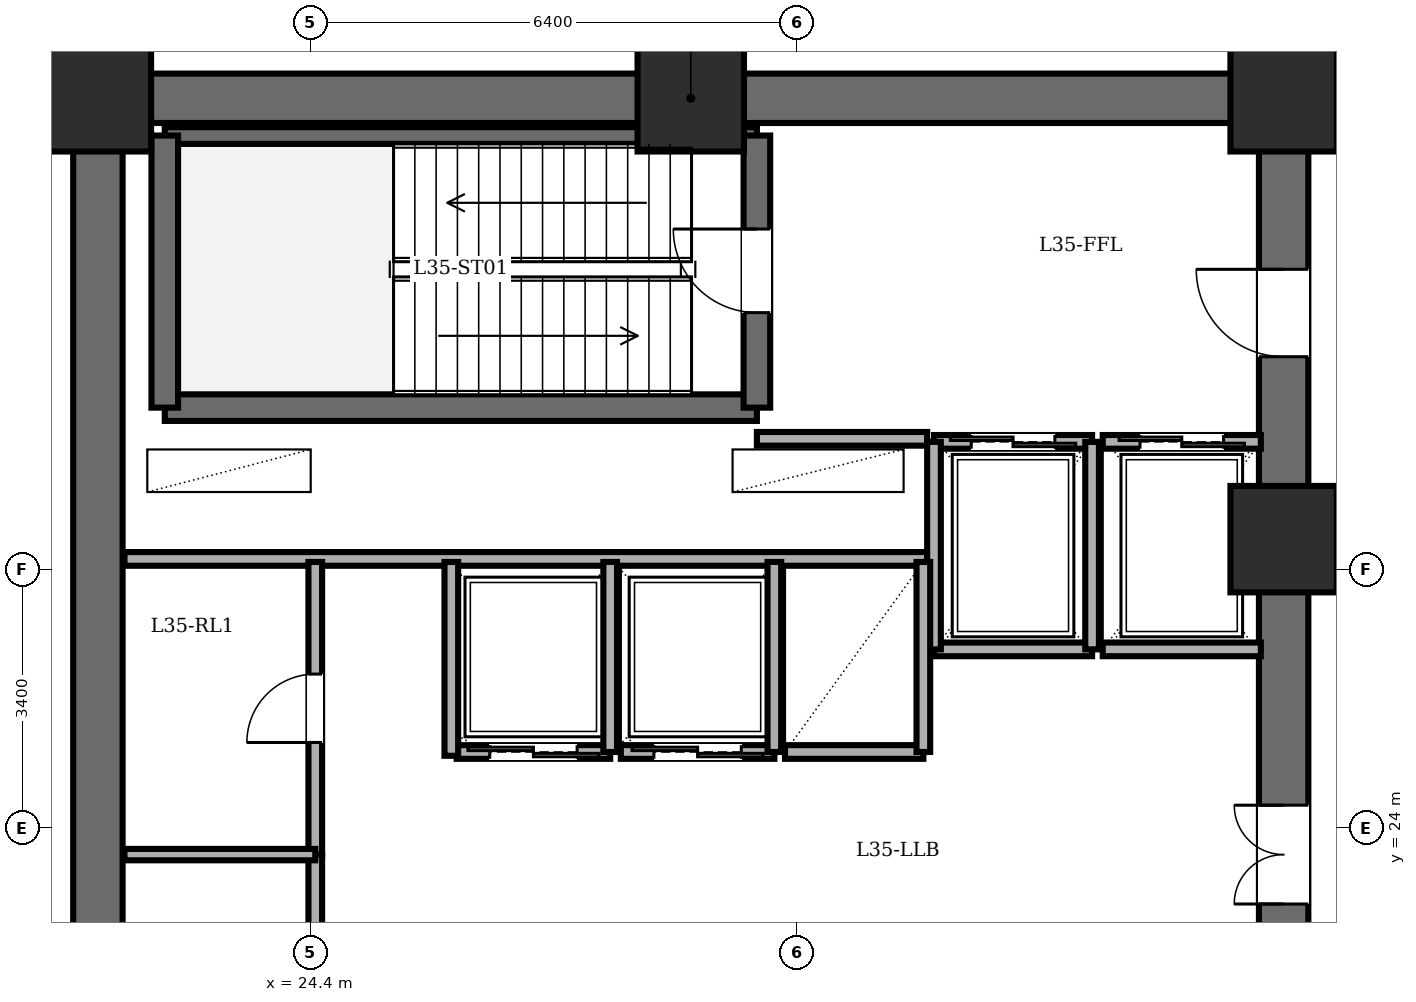
"""IFC4 building model, lengths in metres.
Left out: names, types, materials, properties, quantities, classifications, styles, units other than length and angle.
Written with IfcOpenShell. Run it as: python <this file> out.ifc"""

import sys

from ifc_helpers import new_model, si_unit, direction, frame, frame_2d, origin, origin_2d, place, context, subcontext, project, spatial, rectangle, extrude, element, fill, save


model = new_model("IFC4")
c1 = context("Model", 3, precision=1e-05, world=origin(), true_north=direction((0.0, 1.0)))
c2 = subcontext(c1, "Body", "Model", "MODEL_VIEW")
j1 = project(units=[si_unit("LENGTHUNIT", "METRE"), si_unit("PLANEANGLEUNIT", "RADIAN")], contexts=[c1])
p1 = place(None, origin())
s1 = spatial("IfcSite", under=j1, at=p1, CompositionType="ELEMENT")
p2 = place(p1, origin())
s2 = spatial("IfcBuilding", under=s1, at=p2, CompositionType="ELEMENT")
p3 = place(p2, frame((0.0, 0.0, 133.1)))
s3 = spatial("IfcBuildingStorey", under=s2, at=p3, CompositionType="ELEMENT", Elevation=133.1)
for number, where, z_axis, x_axis in (
    (1, (37.2, 27.8, 0.0), (0.0, 0.0, 1.0), (1.0, 0.0, 0.0)),
    (2, (37.2, 33.6, 0.0), (0.0, 0.0, 1.0), (1.0, 0.0, 0.0)),
    (3, (29.4, 33.6, 0.0), (0.0, 0.0, 1.0), (1.0, 0.0, 0.0)),
    (4, (21.6, 33.6, 0.0), (0.0, 0.0, 1.0), (1.0, 0.0, 0.0)),
):
    element("IfcColumn", number, at=place(p3, frame(where, z_axis=z_axis, x_axis=x_axis)), inside=s3, PredefinedType="COLUMN", context=c2, shape_type="SweptSolid", body=[
        extrude(rectangle(XDim=1.4, YDim=1.4, at=origin_2d()), origin(), (0.0, 0.0, 1.0), 5.6),
    ])
p4 = place(p3, frame((21.6, 14.4, 0.0), z_axis=(0.0, 0.0, 1.0), x_axis=(0.0, 1.0, 0.0)))
e5 = element("IfcWall", 5, at=p4, inside=s3, PredefinedType="SHEAR", context=c2, shape_type="SweptSolid", body=[
    extrude(rectangle(XDim=19.2, YDim=0.65, at=frame_2d((9.6, 0.0))), origin(), (0.0, 0.0, 1.0), 5.36),
])
p5 = place(p3, frame((21.6, 33.6, 0.0), z_axis=(0.0, 0.0, 1.0), x_axis=(1.0, 0.0, 0.0)))
e6 = element("IfcWall", 6, at=p5, inside=s3, PredefinedType="SHEAR", context=c2, shape_type="SweptSolid", body=[
    extrude(rectangle(XDim=15.6, YDim=0.65, at=frame_2d((7.8, 0.0))), origin(), (0.0, 0.0, 1.0), 5.36),
])
p6 = place(p3, frame((37.2, 14.4, 0.0), z_axis=(0.0, 0.0, 1.0), x_axis=(0.0, 1.0, 0.0)))
e7 = element("IfcWall", 7, at=p6, inside=s3, PredefinedType="SHEAR", context=c2, shape_type="SweptSolid", body=[
    extrude(rectangle(XDim=19.2, YDim=0.65, at=frame_2d((9.6, 0.0))), origin(), (0.0, 0.0, 1.0), 5.36),
])
p7 = place(p6, frame((15.8, 0.0, 0.0)))
e8 = element("IfcOpeningElement", 8, at=p7, cuts=e7, PredefinedType="OPENING", context=c2, shape_type="SweptSolid", body=[
    extrude(rectangle(XDim=1.15, YDim=2.15, at=frame_2d((0.575, 1.075))), frame((0.0, 0.335, 0.0), z_axis=(0.0, -1.0, 0.0), x_axis=(1.0, 0.0, 0.0)), (0.0, 0.0, 1.0), 0.67),
])
p8 = place(p6, frame((3.6, 0.0, 0.0)))
e9 = element("IfcOpeningElement", 9, at=p8, cuts=e7, PredefinedType="OPENING", context=c2, shape_type="SweptSolid", body=[
    extrude(rectangle(XDim=1.1, YDim=2.15, at=frame_2d((0.55, 1.075))), frame((0.0, 0.335, 0.0), z_axis=(0.0, -1.0, 0.0), x_axis=(1.0, 0.0, 0.0)), (0.0, 0.0, 1.0), 0.67),
])
p9 = place(p6, frame((8.6, 0.0, 0.0)))
e10 = element("IfcOpeningElement", 10, at=p9, cuts=e7, PredefinedType="OPENING", context=c2, shape_type="SweptSolid", body=[
    extrude(rectangle(XDim=1.3, YDim=2.2, at=frame_2d((0.65, 1.1))), frame((0.0, 0.335, 0.0), z_axis=(0.0, -1.0, 0.0), x_axis=(1.0, 0.0, 0.0)), (0.0, 0.0, 1.0), 0.67),
])
p10 = place(p3, frame((22.48, 29.53, 0.0), z_axis=(0.0, 0.0, 1.0), x_axis=(1.0, 0.0, 0.0)))
e11 = element("IfcWall", 11, at=p10, inside=s3, PredefinedType="SOLIDWALL", context=c2, shape_type="SweptSolid", body=[
    extrude(rectangle(XDim=7.79, YDim=0.35, at=frame_2d((3.895, 0.0))), origin(), (0.0, 0.0, 1.0), 5.36),
])
p11 = place(p3, frame((22.48, 33.11, 0.0), z_axis=(0.0, 0.0, 1.0), x_axis=(1.0, 0.0, 0.0)))
e12 = element("IfcWall", 12, at=p11, inside=s3, PredefinedType="PARTITIONING", context=c2, shape_type="SweptSolid", body=[
    extrude(rectangle(XDim=7.79, YDim=0.22, at=frame_2d((3.895, 0.0))), origin(), (0.0, 0.0, 1.0), 5.36),
])
p12 = place(p3, frame((22.48, 29.53, 0.0), z_axis=(0.0, 0.0, 1.0), x_axis=(0.0, 1.0, 0.0)))
e13 = element("IfcWall", 13, at=p12, inside=s3, PredefinedType="SOLIDWALL", context=c2, shape_type="SweptSolid", body=[
    extrude(rectangle(XDim=3.58, YDim=0.35, at=frame_2d((1.79, 0.0))), origin(), (0.0, 0.0, 1.0), 5.36),
])
p13 = place(p3, frame((30.27, 29.53, 0.0), z_axis=(0.0, 0.0, 1.0), x_axis=(0.0, 1.0, 0.0)))
e14 = element("IfcWall", 14, at=p13, inside=s3, PredefinedType="SOLIDWALL", context=c2, shape_type="SweptSolid", body=[
    extrude(rectangle(XDim=3.58, YDim=0.35, at=frame_2d((1.79, 0.0))), origin(), (0.0, 0.0, 1.0), 5.36),
])
p14 = place(p13, frame((1.25, 0.0, 0.0)))
e15 = element("IfcOpeningElement", 15, at=p14, cuts=e14, PredefinedType="OPENING", context=c2, shape_type="SweptSolid", body=[
    extrude(rectangle(XDim=1.1, YDim=2.15, at=frame_2d((0.55, 1.075))), frame((0.0, 0.185, 0.0), z_axis=(0.0, -1.0, 0.0), x_axis=(1.0, 0.0, 0.0)), (0.0, 0.0, 1.0), 0.37),
])
p15 = place(p3, frame((30.27, 29.12, 0.0), z_axis=(0.0, 0.0, 1.0), x_axis=(1.0, 0.0, 0.0)))
e16 = element("IfcWall", 16, at=p15, inside=s3, PredefinedType="PARTITIONING", context=c2, shape_type="SweptSolid", body=[
    extrude(rectangle(XDim=2.24, YDim=0.18, at=frame_2d((1.12, 0.0))), origin(), (0.0, 0.0, 1.0), 5.36),
])
p16 = place(p3, frame((21.95, 27.54, 0.0), z_axis=(0.0, 0.0, 1.0), x_axis=(1.0, 0.0, 0.0)))
e17 = element("IfcWall", 17, at=p16, inside=s3, PredefinedType="PARTITIONING", context=c2, shape_type="SweptSolid", body=[
    extrude(rectangle(XDim=10.56, YDim=0.18, at=frame_2d((5.28, 0.0))), origin(), (0.0, 0.0, 1.0), 5.36),
])
p17 = place(p3, frame((32.6, 29.08, 0.0), z_axis=(0.0, 0.0, 1.0), x_axis=(1.0, 0.0, 0.0)))
e18 = element("IfcWall", 18, at=p17, inside=s3, PredefinedType="PARTITIONING", context=c2, shape_type="SweptSolid", body=[
    extrude(rectangle(XDim=2.08, YDim=0.18, at=frame_2d((1.04, 0.0))), origin(), (0.0, 0.0, 1.0), 5.36),
])
p18 = place(p17, frame((0.49, 0.0, 0.0)))
e19 = element("IfcOpeningElement", 19, at=p18, cuts=e18, PredefinedType="OPENING", context=c2, shape_type="SweptSolid", body=[
    extrude(rectangle(XDim=1.1, YDim=2.2, at=frame_2d((0.55, 1.1))), frame((0.0, 0.1, 0.0), z_axis=(0.0, -1.0, 0.0), x_axis=(1.0, 0.0, 0.0)), (0.0, 0.0, 1.0), 0.2),
])
p19 = place(p3, frame((34.68, 26.35, 0.0), z_axis=(0.0, 0.0, 1.0), x_axis=(-1.0, 0.0, 0.0)))
e20 = element("IfcWall", 20, at=p19, inside=s3, PredefinedType="PARTITIONING", context=c2, shape_type="SweptSolid", body=[
    extrude(rectangle(XDim=2.08, YDim=0.18, at=frame_2d((1.04, 0.0))), origin(), (0.0, 0.0, 1.0), 5.36),
])
for number, where, z_axis, x_axis in (
    (21, (34.68, 26.35, 0.0), (0.0, 0.0, 1.0), (0.0, 1.0, 0.0)),
    (22, (32.6, 29.08, 0.0), (0.0, 0.0, 1.0), (0.0, -1.0, 0.0)),
):
    element("IfcWall", number, at=place(p3, frame(where, z_axis=z_axis, x_axis=x_axis)), inside=s3, PredefinedType="PARTITIONING", context=c2, shape_type="SweptSolid", body=[
        extrude(rectangle(XDim=2.73, YDim=0.18, at=frame_2d((1.365, 0.0))), origin(), (0.0, 0.0, 1.0), 5.36),
    ])
p20 = place(p3, frame((34.82, 29.08, 0.0), z_axis=(0.0, 0.0, 1.0), x_axis=(1.0, 0.0, 0.0)))
e23 = element("IfcWall", 23, at=p20, inside=s3, PredefinedType="PARTITIONING", context=c2, shape_type="SweptSolid", body=[
    extrude(rectangle(XDim=2.08, YDim=0.18, at=frame_2d((1.04, 0.0))), origin(), (0.0, 0.0, 1.0), 5.36),
])
p21 = place(p20, frame((0.49, 0.0, 0.0)))
e24 = element("IfcOpeningElement", 24, at=p21, cuts=e23, PredefinedType="OPENING", context=c2, shape_type="SweptSolid", body=[
    extrude(rectangle(XDim=1.1, YDim=2.2, at=frame_2d((0.55, 1.1))), frame((0.0, 0.1, 0.0), z_axis=(0.0, -1.0, 0.0), x_axis=(1.0, 0.0, 0.0)), (0.0, 0.0, 1.0), 0.2),
])
p22 = place(p3, frame((36.9, 26.35, 0.0), z_axis=(0.0, 0.0, 1.0), x_axis=(-1.0, 0.0, 0.0)))
e25 = element("IfcWall", 25, at=p22, inside=s3, PredefinedType="PARTITIONING", context=c2, shape_type="SweptSolid", body=[
    extrude(rectangle(XDim=2.08, YDim=0.18, at=frame_2d((1.04, 0.0))), origin(), (0.0, 0.0, 1.0), 5.36),
])
p23 = place(p3, frame((28.34, 25.0, 0.0), z_axis=(0.0, 0.0, 1.0), x_axis=(-1.0, 0.0, 0.0)))
e26 = element("IfcWall", 26, at=p23, inside=s3, PredefinedType="PARTITIONING", context=c2, shape_type="SweptSolid", body=[
    extrude(rectangle(XDim=2.02, YDim=0.18, at=frame_2d((1.01, 0.0))), origin(), (0.0, 0.0, 1.0), 5.36),
])
p24 = place(p23, frame((0.435, 0.0, 0.0)))
e27 = element("IfcOpeningElement", 27, at=p24, cuts=e26, PredefinedType="OPENING", context=c2, shape_type="SweptSolid", body=[
    extrude(rectangle(XDim=1.15, YDim=2.2, at=frame_2d((0.575, 1.1))), frame((0.0, 0.1, 0.0), z_axis=(0.0, -1.0, 0.0), x_axis=(1.0, 0.0, 0.0)), (0.0, 0.0, 1.0), 0.2),
])
p25 = place(p3, frame((28.34, 25.0, 0.0), z_axis=(0.0, 0.0, 1.0), x_axis=(0.0, 1.0, 0.0)))
e28 = element("IfcWall", 28, at=p25, inside=s3, PredefinedType="PARTITIONING", context=c2, shape_type="SweptSolid", body=[
    extrude(rectangle(XDim=2.5, YDim=0.18, at=frame_2d((1.25, 0.0))), origin(), (0.0, 0.0, 1.0), 5.36),
])
p26 = place(p3, frame((30.5, 25.0, 0.0), z_axis=(0.0, 0.0, 1.0), x_axis=(-1.0, 0.0, 0.0)))
e29 = element("IfcWall", 29, at=p26, inside=s3, PredefinedType="PARTITIONING", context=c2, shape_type="SweptSolid", body=[
    extrude(rectangle(XDim=2.02, YDim=0.18, at=frame_2d((1.01, 0.0))), origin(), (0.0, 0.0, 1.0), 5.36),
])
p27 = place(p26, frame((0.435, 0.0, 0.0)))
e30 = element("IfcOpeningElement", 30, at=p27, cuts=e29, PredefinedType="OPENING", context=c2, shape_type="SweptSolid", body=[
    extrude(rectangle(XDim=1.15, YDim=2.2, at=frame_2d((0.575, 1.1))), frame((0.0, 0.1, 0.0), z_axis=(0.0, -1.0, 0.0), x_axis=(1.0, 0.0, 0.0)), (0.0, 0.0, 1.0), 0.2),
])
p28 = place(p3, frame((30.5, 25.0, 0.0), z_axis=(0.0, 0.0, 1.0), x_axis=(0.0, 1.0, 0.0)))
e31 = element("IfcWall", 31, at=p28, inside=s3, PredefinedType="PARTITIONING", context=c2, shape_type="SweptSolid", body=[
    extrude(rectangle(XDim=2.5, YDim=0.18, at=frame_2d((1.25, 0.0))), origin(), (0.0, 0.0, 1.0), 5.36),
])
p29 = place(p3, frame((32.46, 25.0, 0.0), z_axis=(0.0, 0.0, 1.0), x_axis=(-1.0, 0.0, 0.0)))
e32 = element("IfcWall", 32, at=p29, inside=s3, PredefinedType="PARTITIONING", context=c2, shape_type="SweptSolid", body=[
    extrude(rectangle(XDim=1.82, YDim=0.18, at=frame_2d((0.91, 0.0))), origin(), (0.0, 0.0, 1.0), 5.36),
])
p30 = place(p3, frame((32.46, 25.0, 0.0), z_axis=(0.0, 0.0, 1.0), x_axis=(0.0, 1.0, 0.0)))
e33 = element("IfcWall", 33, at=p30, inside=s3, PredefinedType="PARTITIONING", context=c2, shape_type="SweptSolid", body=[
    extrude(rectangle(XDim=2.5, YDim=0.18, at=frame_2d((1.25, 0.0))), origin(), (0.0, 0.0, 1.0), 5.36),
])
p31 = place(p3, frame((24.46, 23.65, 0.0), z_axis=(0.0, 0.0, 1.0), x_axis=(0.0, 1.0, 0.0)))
e34 = element("IfcWall", 34, at=p31, inside=s3, PredefinedType="PARTITIONING", context=c2, shape_type="SweptSolid", body=[
    extrude(rectangle(XDim=3.85, YDim=0.18, at=frame_2d((1.925, 0.0))), origin(), (0.0, 0.0, 1.0), 5.36),
])
p32 = place(p31, frame((1.475, 0.0, 0.0)))
e35 = element("IfcOpeningElement", 35, at=p32, cuts=e34, PredefinedType="OPENING", context=c2, shape_type="SweptSolid", body=[
    extrude(rectangle(XDim=0.9, YDim=2.05, at=frame_2d((0.45, 1.025))), frame((0.0, 0.1, 0.0), z_axis=(0.0, -1.0, 0.0), x_axis=(1.0, 0.0, 0.0)), (0.0, 0.0, 1.0), 0.2),
])
p33 = place(p3, frame((24.46, 19.8, 0.0), z_axis=(0.0, 0.0, 1.0), x_axis=(0.0, 1.0, 0.0)))
e36 = element("IfcWall", 36, at=p33, inside=s3, PredefinedType="PARTITIONING", context=c2, shape_type="SweptSolid", body=[
    extrude(rectangle(XDim=3.85, YDim=0.18, at=frame_2d((1.925, 0.0))), origin(), (0.0, 0.0, 1.0), 5.36),
])
p34 = place(p33, frame((1.475, 0.0, 0.0)))
e37 = element("IfcOpeningElement", 37, at=p34, cuts=e36, PredefinedType="OPENING", context=c2, shape_type="SweptSolid", body=[
    extrude(rectangle(XDim=0.9, YDim=2.05, at=frame_2d((0.45, 1.025))), frame((0.0, 0.1, 0.0), z_axis=(0.0, -1.0, 0.0), x_axis=(1.0, 0.0, 0.0)), (0.0, 0.0, 1.0), 0.2),
])
p35 = place(p3, frame((21.95, 23.65, 0.0), z_axis=(0.0, 0.0, 1.0), x_axis=(1.0, 0.0, 0.0)))
e38 = element("IfcWall", 38, at=p35, inside=s3, PredefinedType="PARTITIONING", context=c2, shape_type="SweptSolid", body=[
    extrude(rectangle(XDim=2.51, YDim=0.15, at=frame_2d((1.255, 0.0))), origin(), (0.0, 0.0, 1.0), 5.36),
])
p36 = place(p3, frame((26.25, 24.95, 0.0), z_axis=(0.0, 0.0, 1.0), x_axis=(0.0, 1.0, 0.0)))
e39 = element("IfcWall", 39, at=p36, inside=s3, PredefinedType="PARTITIONING", context=c2, shape_type="SweptSolid", body=[
    extrude(rectangle(XDim=2.55, YDim=0.18, at=frame_2d((1.275, 0.0))), origin(), (0.0, 0.0, 1.0), 5.36),
])
p37 = place(p3, frame((16.5, 33.8, 0.0), z_axis=(0.0, 0.0, 1.0), x_axis=(1.0, 0.0, 0.0)))
e40 = element("IfcWall", 40, at=p37, inside=s3, PredefinedType="PARTITIONING", context=c2, shape_type="SweptSolid", body=[
    extrude(rectangle(XDim=4.9, YDim=0.22, at=frame_2d((2.45, 0.0))), origin(), (0.0, 0.0, 1.0), 5.36),
])
p38 = place(p14, origin())
e41 = element("IfcDoor", 41, at=p38, inside=s3, OperationType="SINGLE_SWING_RIGHT", PredefinedType="DOOR", context=c2, shape_type="SweptSolid", body=[
    extrude(rectangle(XDim=1.1, YDim=2.15, at=frame_2d((0.55, 1.075))), frame((0.0, 0.025, 0.0), z_axis=(0.0, -1.0, 0.0), x_axis=(1.0, 0.0, 0.0)), (0.0, 0.0, 1.0), 0.05),
])
fill(e15, e41)
p39 = place(p7, origin())
e42 = element("IfcDoor", 42, at=p39, inside=s3, OperationType="SINGLE_SWING_RIGHT", PredefinedType="DOOR", context=c2, shape_type="SweptSolid", body=[
    extrude(rectangle(XDim=1.15, YDim=2.15, at=frame_2d((0.575, 1.075))), frame((0.0, 0.025, 0.0), z_axis=(0.0, -1.0, 0.0), x_axis=(1.0, 0.0, 0.0)), (0.0, 0.0, 1.0), 0.05),
])
fill(e8, e42)
p40 = place(p18, origin())
e43 = element("IfcDoor", 43, at=p40, inside=s3, OperationType="DOUBLE_DOOR_SLIDING", PredefinedType="DOOR", context=c2, shape_type="SweptSolid", body=[
    extrude(rectangle(XDim=1.1, YDim=2.2, at=frame_2d((0.55, 1.1))), frame((0.0, 0.025, 0.0), z_axis=(0.0, -1.0, 0.0), x_axis=(1.0, 0.0, 0.0)), (0.0, 0.0, 1.0), 0.05),
])
fill(e19, e43)
p41 = place(p21, origin())
e44 = element("IfcDoor", 44, at=p41, inside=s3, OperationType="DOUBLE_DOOR_SLIDING", PredefinedType="DOOR", context=c2, shape_type="SweptSolid", body=[
    extrude(rectangle(XDim=1.1, YDim=2.2, at=frame_2d((0.55, 1.1))), frame((0.0, 0.025, 0.0), z_axis=(0.0, -1.0, 0.0), x_axis=(1.0, 0.0, 0.0)), (0.0, 0.0, 1.0), 0.05),
])
fill(e24, e44)
p42 = place(p24, origin())
e45 = element("IfcDoor", 45, at=p42, inside=s3, OperationType="DOUBLE_DOOR_SLIDING", PredefinedType="DOOR", context=c2, shape_type="SweptSolid", body=[
    extrude(rectangle(XDim=1.15, YDim=2.2, at=frame_2d((0.575, 1.1))), frame((0.0, 0.025, 0.0), z_axis=(0.0, -1.0, 0.0), x_axis=(1.0, 0.0, 0.0)), (0.0, 0.0, 1.0), 0.05),
])
fill(e27, e45)
p43 = place(p27, origin())
e46 = element("IfcDoor", 46, at=p43, inside=s3, OperationType="DOUBLE_DOOR_SLIDING", PredefinedType="DOOR", context=c2, shape_type="SweptSolid", body=[
    extrude(rectangle(XDim=1.15, YDim=2.2, at=frame_2d((0.575, 1.1))), frame((0.0, 0.025, 0.0), z_axis=(0.0, -1.0, 0.0), x_axis=(1.0, 0.0, 0.0)), (0.0, 0.0, 1.0), 0.05),
])
fill(e30, e46)
p44 = place(p32, origin())
e47 = element("IfcDoor", 47, at=p44, inside=s3, OperationType="SINGLE_SWING_LEFT", PredefinedType="DOOR", context=c2, shape_type="SweptSolid", body=[
    extrude(rectangle(XDim=0.9, YDim=2.05, at=frame_2d((0.45, 1.025))), frame((0.0, 0.025, 0.0), z_axis=(0.0, -1.0, 0.0), x_axis=(1.0, 0.0, 0.0)), (0.0, 0.0, 1.0), 0.05),
])
fill(e35, e47)
p45 = place(p9, origin())
e48 = element("IfcDoor", 48, at=p45, inside=s3, OperationType="DOUBLE_DOOR_SINGLE_SWING", PredefinedType="DOOR", context=c2, shape_type="SweptSolid", body=[
    extrude(rectangle(XDim=1.3, YDim=2.2, at=frame_2d((0.65, 1.1))), frame((0.0, 0.025, 0.0), z_axis=(0.0, -1.0, 0.0), x_axis=(1.0, 0.0, 0.0)), (0.0, 0.0, 1.0), 0.05),
])
fill(e10, e48)
save(model, sys.argv[1])
